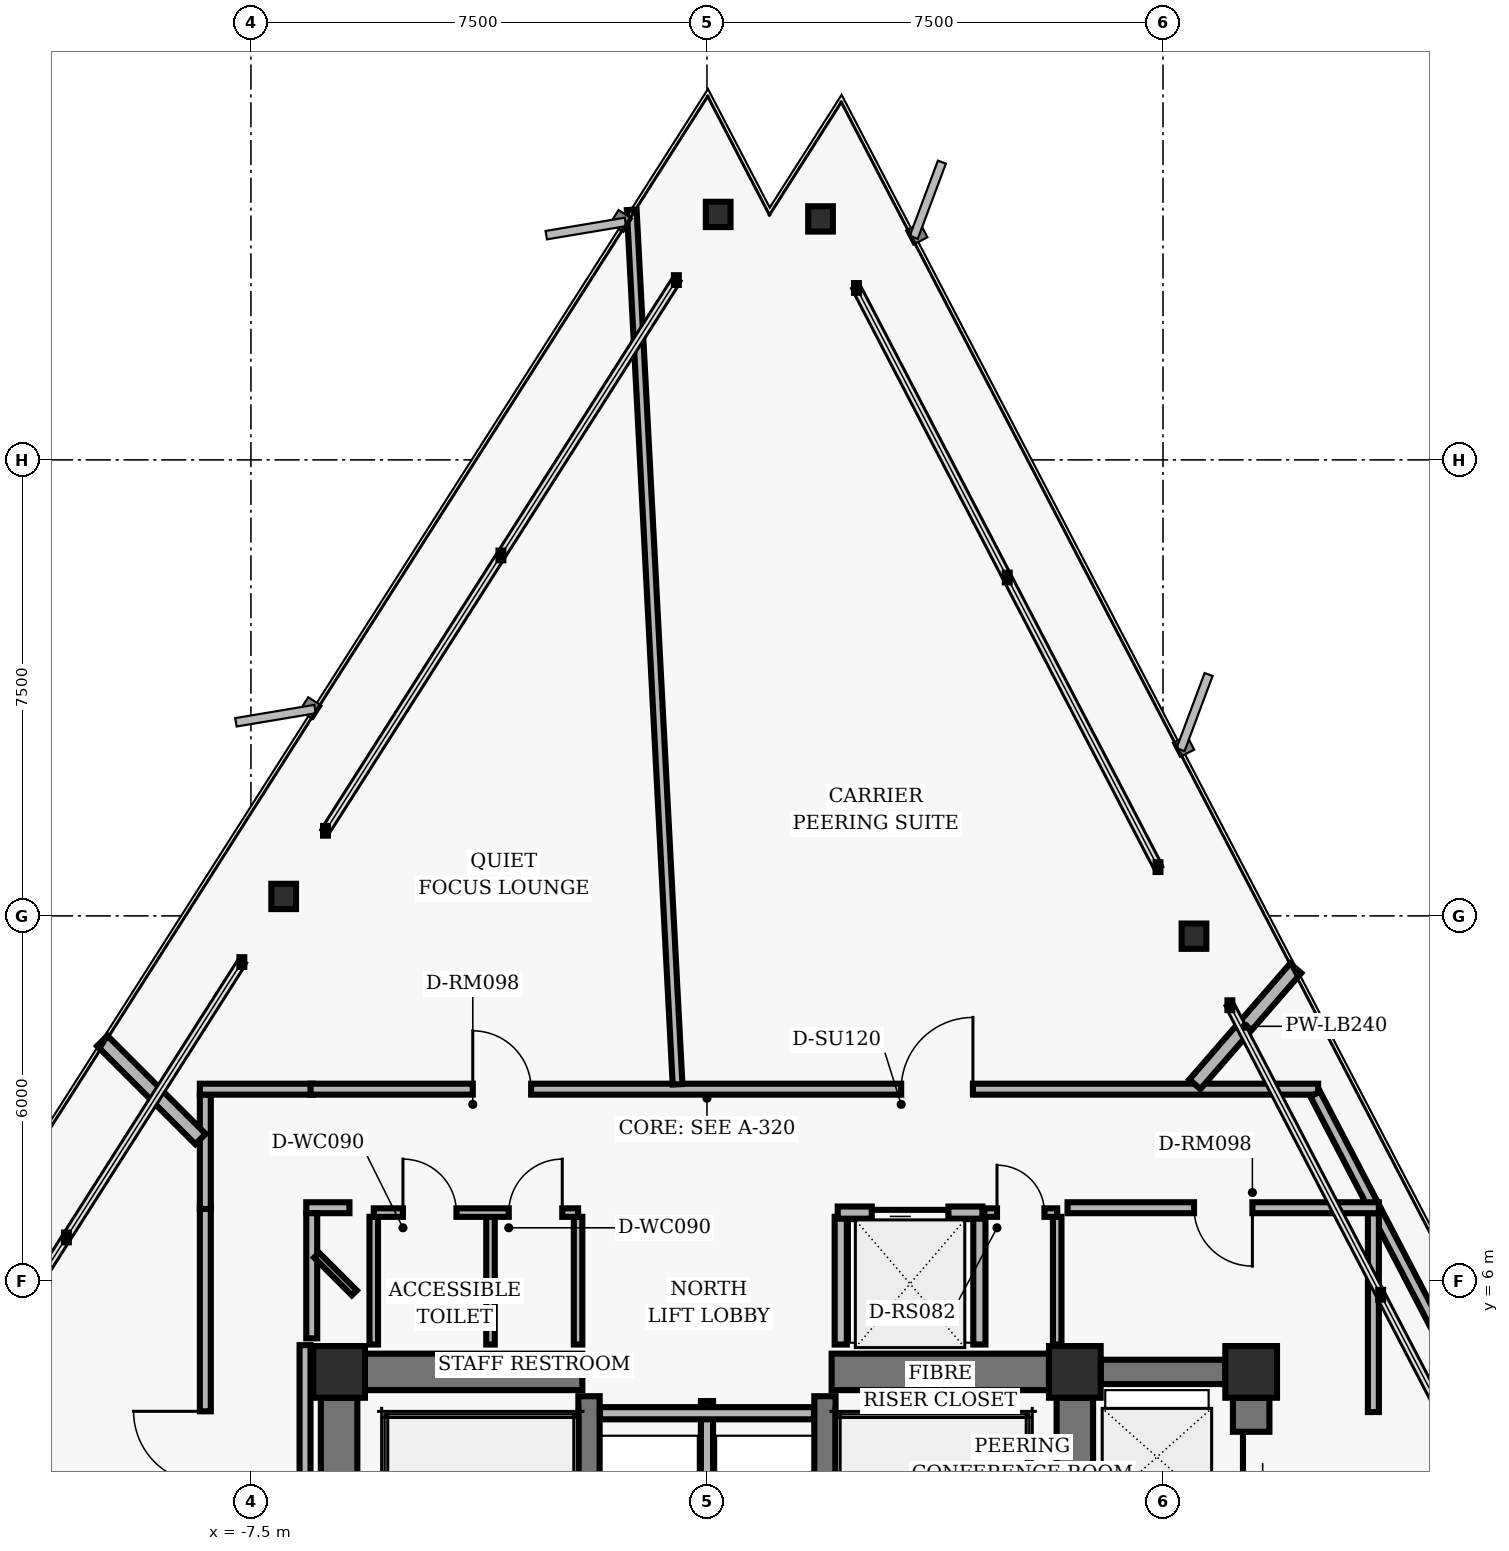
"""IFC4 building model, lengths in metres.
Left out: names, types, materials, properties, quantities, classifications, styles, units other than length and angle.
Written with IfcOpenShell. Run it as: python <this file> out.ifc"""

import sys

from ifc_helpers import new_model, si_unit, direction, frame, frame_2d, origin, origin_2d, place, context, subcontext, project, spatial, rectangle, hollow_rectangle, i_section, extrude, element, fill, save


model = new_model("IFC4")
c1 = context("Model", 3, precision=1e-05, world=origin(), true_north=direction((0.0, 1.0)))
c2 = subcontext(c1, "Body", "Model", "MODEL_VIEW")
j1 = project(units=[si_unit("LENGTHUNIT", "METRE"), si_unit("PLANEANGLEUNIT", "RADIAN")], contexts=[c1])
p1 = place(None, origin())
s1 = spatial("IfcSite", under=j1, at=p1, CompositionType="ELEMENT")
p2 = place(p1, origin())
s2 = spatial("IfcBuilding", under=s1, at=p2, CompositionType="ELEMENT")
p3 = place(p2, frame((0.0, 0.0, 132.0)))
s3 = spatial("IfcBuildingStorey", under=s2, at=p3, CompositionType="ELEMENT", Elevation=132.0)
for number, where, z_axis, x_axis in (
    (1, (-6.05, 4.5, 0.0), (0.0, 0.0, 1.0), (1.0, 0.0, 0.0)),
    (2, (6.05, 4.5, 0.0), (0.0, 0.0, 1.0), (1.0, 0.0, 0.0)),
    (3, (8.95, 4.5, 0.0), (0.0, 0.0, 1.0), (1.0, 0.0, 0.0)),
):
    element("IfcColumn", number, at=place(p3, frame(where, z_axis=z_axis, x_axis=x_axis)), inside=s3, PredefinedType="COLUMN", context=c2, shape_type="SweptSolid", body=[
        extrude(hollow_rectangle(XDim=0.85, YDim=0.85, WallThickness=0.055, InnerFilletRadius=0.02, OuterFilletRadius=0.04, at=origin_2d()), origin(), (0.0, 0.0, 1.0), 3.04),
    ])
for number, where, z_axis, x_axis in (
    (4, (-6.05, 0.425, 0.0), (0.0, 0.0, 1.0), (0.0, 1.0, 0.0)),
    (5, (6.05, 0.425, 0.0), (0.0, 0.0, 1.0), (0.0, 1.0, 0.0)),
):
    element("IfcWall", number, at=place(p3, frame(where, z_axis=z_axis, x_axis=x_axis)), inside=s3, PredefinedType="SHEAR", context=c2, shape_type="SweptSolid", body=[
        extrude(rectangle(XDim=3.65, YDim=0.6, at=frame_2d((1.825, 0.0))), origin(), (0.0, 0.0, 1.0), 2.788),
    ])
for number, where, z_axis, x_axis in (
    (6, (-1.94, -4.1, 0.0), (0.0, 0.0, 1.0), (0.0, 1.0, 0.0)),
    (7, (1.94, -4.1, 0.0), (0.0, 0.0, 1.0), (0.0, 1.0, 0.0)),
):
    element("IfcWall", number, at=place(p3, frame(where, z_axis=z_axis, x_axis=x_axis)), inside=s3, PredefinedType="SHEAR", context=c2, shape_type="SweptSolid", body=[
        extrude(rectangle(XDim=8.2, YDim=0.35, at=frame_2d((4.1, 0.0))), origin(), (0.0, 0.0, 1.0), 2.788),
    ])
for number, where, z_axis, x_axis in (
    (8, (-5.625, 4.5, 0.0), (0.0, 0.0, 1.0), (1.0, 0.0, 0.0)),
    (9, (2.05, 4.5, 0.0), (0.0, 0.0, 1.0), (1.0, 0.0, 0.0)),
):
    element("IfcWall", number, at=place(p3, frame(where, z_axis=z_axis, x_axis=x_axis)), inside=s3, PredefinedType="SHEAR", context=c2, shape_type="SweptSolid", body=[
        extrude(rectangle(XDim=3.575, YDim=0.6, at=frame_2d((1.788, 0.0))), origin(), (0.0, 0.0, 1.0), 2.788),
    ])
p4 = place(p3, frame((8.95, -3.875, 0.0), z_axis=(0.0, 0.0, 1.0), x_axis=(0.0, 1.0, 0.0)))
e10 = element("IfcWall", 10, at=p4, inside=s3, PredefinedType="SHEAR", context=c2, shape_type="SweptSolid", body=[
    extrude(rectangle(XDim=7.95, YDim=0.6, at=frame_2d((3.975, 0.0))), origin(), (0.0, 0.0, 1.0), 2.788),
])
p5 = place(p4, frame((0.55, 0.0, 0.0)))
e11 = element("IfcOpeningElement", 11, at=p5, cuts=e10, PredefinedType="OPENING", context=c2, shape_type="SweptSolid", body=[
    extrude(rectangle(XDim=1.06, YDim=2.04, at=frame_2d((0.53, 1.02))), frame((0.0, 0.31, 0.0), z_axis=(0.0, -1.0, 0.0), x_axis=(1.0, 0.0, 0.0)), (0.0, 0.0, 1.0), 0.62),
])
p6 = place(p4, frame((3.445, 0.0, 0.0)))
e12 = element("IfcOpeningElement", 12, at=p6, cuts=e10, PredefinedType="OPENING", context=c2, shape_type="SweptSolid", body=[
    extrude(rectangle(XDim=1.06, YDim=2.04, at=frame_2d((0.53, 1.02))), frame((0.0, 0.31, 0.0), z_axis=(0.0, -1.0, 0.0), x_axis=(1.0, 0.0, 0.0)), (0.0, 0.0, 1.0), 0.62),
])
p7 = place(p4, frame((6.33, 0.0, 0.0)))
e13 = element("IfcOpeningElement", 13, at=p7, cuts=e10, PredefinedType="OPENING", context=c2, shape_type="SweptSolid", body=[
    extrude(rectangle(XDim=1.06, YDim=2.04, at=frame_2d((0.53, 1.02))), frame((0.0, 0.31, 0.0), z_axis=(0.0, -1.0, 0.0), x_axis=(1.0, 0.0, 0.0)), (0.0, 0.0, 1.0), 0.62),
])
p8 = place(p3, frame((6.475, 4.5, 0.0), z_axis=(0.0, 0.0, 1.0), x_axis=(1.0, 0.0, 0.0)))
e14 = element("IfcWall", 14, at=p8, inside=s3, PredefinedType="SHEAR", context=c2, shape_type="SweptSolid", body=[
    extrude(rectangle(XDim=2.05, YDim=0.4, at=frame_2d((1.025, 0.0))), origin(), (0.0, 0.0, 1.0), 2.788),
])
for number, where, z_axis, x_axis in (
    (15, (8.009, 11.666, 0.0), (0.0, 0.0, 1.0), (1.0, 0.0, 0.0)),
    (16, (1.868, 23.463, 0.0), (0.0, 0.0, 1.0), (1.0, 0.0, 0.0)),
    (17, (0.184, 23.537, 0.0), (0.0, 0.0, 1.0), (1.0, 0.0, 0.0)),
    (18, (-6.962, 12.32, 0.0), (0.0, 0.0, 1.0), (1.0, 0.0, 0.0)),
):
    element("IfcColumn", number, at=place(p3, frame(where, z_axis=z_axis, x_axis=x_axis)), inside=s3, PredefinedType="COLUMN", context=c2, shape_type="SweptSolid", body=[
        extrude(i_section(OverallWidth=0.406, OverallDepth=0.416, WebThickness=0.03, FlangeThickness=0.048, FilletRadius=0.02, at=origin_2d()), origin(), (0.0, 0.0, 1.0), 3.04),
    ])
p9 = place(p3, frame((0.0, 1.25, 0.0), z_axis=(0.0, 0.0, 1.0), x_axis=(0.0, 1.0, 0.0)))
e19 = element("IfcWall", 19, at=p9, inside=s3, PredefinedType="PARTITIONING", context=c2, shape_type="SweptSolid", body=[
    extrude(rectangle(XDim=2.77, YDim=0.2, at=frame_2d((1.385, 0.0))), origin(), (0.0, 0.0, 1.0), 2.763),
])
p10 = place(p3, frame((-1.76, 3.82, 0.0), z_axis=(0.0, 0.0, 1.0), x_axis=(1.0, 0.0, 0.0)))
e20 = element("IfcWall", 20, at=p10, inside=s3, PredefinedType="PARTITIONING", context=c2, shape_type="SweptSolid", body=[
    extrude(rectangle(XDim=3.52, YDim=0.2, at=frame_2d((1.76, 0.0))), origin(), (0.0, 0.0, 1.0), 2.763),
])
for number, where, z_axis, x_axis in (
    (21, (2.2, 4.95, 0.0), (0.0, 0.0, 1.0), (0.0, 1.0, 0.0)),
    (22, (4.48, 4.95, 0.0), (0.0, 0.0, 1.0), (0.0, 1.0, 0.0)),
):
    element("IfcWall", number, at=place(p3, frame(where, z_axis=z_axis, x_axis=x_axis)), inside=s3, PredefinedType="PARTITIONING", context=c2, shape_type="SweptSolid", body=[
        extrude(rectangle(XDim=2.1, YDim=0.2, at=frame_2d((1.05, 0.0))), origin(), (0.0, 0.0, 1.0), 2.763),
    ])
p11 = place(p3, frame((2.15, 7.12, 0.0), z_axis=(0.0, 0.0, 1.0), x_axis=(1.0, 0.0, 0.0)))
e23 = element("IfcWall", 23, at=p11, inside=s3, PredefinedType="PARTITIONING", context=c2, shape_type="SweptSolid", body=[
    extrude(rectangle(XDim=2.38, YDim=0.2, at=frame_2d((1.19, 0.0))), origin(), (0.0, 0.0, 1.0), 2.763),
])
p12 = place(p11, frame((0.56, 0.0, 0.0)))
e24 = element("IfcOpeningElement", 24, at=p12, cuts=e23, PredefinedType="OPENING", context=c2, shape_type="SweptSolid", body=[
    extrude(rectangle(XDim=1.26, YDim=2.06, at=frame_2d((0.63, 1.03))), frame((0.0, 0.11, 0.0), z_axis=(0.0, -1.0, 0.0), x_axis=(1.0, 0.0, 0.0)), (0.0, 0.0, 1.0), 0.22),
])
for number, where, z_axis, x_axis in (
    (25, (-5.48, 4.95, 0.0), (0.0, 0.0, 1.0), (0.0, 1.0, 0.0)),
    (26, (-3.56, 4.95, 0.0), (0.0, 0.0, 1.0), (0.0, 1.0, 0.0)),
    (27, (-2.12, 4.95, 0.0), (0.0, 0.0, 1.0), (0.0, 1.0, 0.0)),
):
    element("IfcWall", number, at=place(p3, frame(where, z_axis=z_axis, x_axis=x_axis)), inside=s3, PredefinedType="PARTITIONING", context=c2, shape_type="SweptSolid", body=[
        extrude(rectangle(XDim=2.1, YDim=0.14, at=frame_2d((1.05, 0.0))), origin(), (0.0, 0.0, 1.0), 2.763),
    ])
p13 = place(p3, frame((-5.48, 7.12, 0.0), z_axis=(0.0, 0.0, 1.0), x_axis=(1.0, 0.0, 0.0)))
e28 = element("IfcWall", 28, at=p13, inside=s3, PredefinedType="PARTITIONING", context=c2, shape_type="SweptSolid", body=[
    extrude(rectangle(XDim=3.36, YDim=0.14, at=frame_2d((1.68, 0.0))), origin(), (0.0, 0.0, 1.0), 2.33),
])
p14 = place(p13, frame((0.48, 0.0, 0.0)))
e29 = element("IfcOpeningElement", 29, at=p14, cuts=e28, PredefinedType="OPENING", context=c2, shape_type="SweptSolid", body=[
    extrude(rectangle(XDim=0.88, YDim=2.02, at=frame_2d((0.44, 1.01))), frame((0.0, 0.08, 0.0), z_axis=(0.0, -1.0, 0.0), x_axis=(1.0, 0.0, 0.0)), (0.0, 0.0, 1.0), 0.16),
])
p15 = place(p13, frame((2.22, 0.0, 0.0)))
e30 = element("IfcOpeningElement", 30, at=p15, cuts=e28, PredefinedType="OPENING", context=c2, shape_type="SweptSolid", body=[
    extrude(rectangle(XDim=0.88, YDim=2.02, at=frame_2d((0.44, 1.01))), frame((0.0, 0.08, 0.0), z_axis=(0.0, -1.0, 0.0), x_axis=(1.0, 0.0, 0.0)), (0.0, 0.0, 1.0), 0.16),
])
p16 = place(p3, frame((5.76, 4.95, 0.0), z_axis=(0.0, 0.0, 1.0), x_axis=(0.0, 1.0, 0.0)))
e31 = element("IfcWall", 31, at=p16, inside=s3, PredefinedType="PARTITIONING", context=c2, shape_type="SweptSolid", body=[
    extrude(rectangle(XDim=2.1, YDim=0.14, at=frame_2d((1.05, 0.0))), origin(), (0.0, 0.0, 1.0), 2.763),
])
p17 = place(p3, frame((4.56, 7.12, 0.0), z_axis=(0.0, 0.0, 1.0), x_axis=(1.0, 0.0, 0.0)))
e32 = element("IfcWall", 32, at=p17, inside=s3, PredefinedType="PARTITIONING", context=c2, shape_type="SweptSolid", body=[
    extrude(rectangle(XDim=1.2, YDim=0.14, at=frame_2d((0.6, 0.0))), origin(), (0.0, 0.0, 1.0), 2.763),
])
p18 = place(p17, frame((0.21, 0.0, 0.0)))
e33 = element("IfcOpeningElement", 33, at=p18, cuts=e32, PredefinedType="OPENING", context=c2, shape_type="SweptSolid", body=[
    extrude(rectangle(XDim=0.78, YDim=2.01, at=frame_2d((0.39, 1.005))), frame((0.0, 0.08, 0.0), z_axis=(0.0, -1.0, 0.0), x_axis=(1.0, 0.0, 0.0)), (0.0, 0.0, 1.0), 0.16),
])
p19 = place(p3, frame((-8.25, -7.22, 0.0), z_axis=(0.0, 0.0, 1.0), x_axis=(0.0, 1.0, 0.0)))
e34 = element("IfcWall", 34, at=p19, inside=s3, PredefinedType="PARTITIONING", context=c2, shape_type="SweptSolid", body=[
    extrude(rectangle(XDim=14.44, YDim=0.18, at=frame_2d((7.22, 0.0))), origin(), (0.0, 0.0, 1.0), 2.763),
])
p20 = place(p19, frame((2.932, 0.0, 0.0)))
e35 = element("IfcOpeningElement", 35, at=p20, cuts=e34, PredefinedType="OPENING", context=c2, shape_type="SweptSolid", body=[
    extrude(rectangle(XDim=1.18, YDim=2.02, at=frame_2d((0.59, 1.01))), frame((0.0, 0.1, 0.0), z_axis=(0.0, -1.0, 0.0), x_axis=(1.0, 0.0, 0.0)), (0.0, 0.0, 1.0), 0.2),
])
p21 = place(p19, frame((9.892, 0.0, 0.0)))
e36 = element("IfcOpeningElement", 36, at=p21, cuts=e34, PredefinedType="OPENING", context=c2, shape_type="SweptSolid", body=[
    extrude(rectangle(XDim=1.18, YDim=2.02, at=frame_2d((0.59, 1.01))), frame((0.0, 0.1, 0.0), z_axis=(0.0, -1.0, 0.0), x_axis=(1.0, 0.0, 0.0)), (0.0, 0.0, 1.0), 0.2),
])
p22 = place(p3, frame((-8.25, 7.18, 0.0), z_axis=(0.0, 0.0, 1.0), x_axis=(0.0, 1.0, 0.0)))
e37 = element("IfcWall", 37, at=p22, inside=s3, PredefinedType="PARTITIONING", context=c2, shape_type="SweptSolid", body=[
    extrude(rectangle(XDim=1.88, YDim=0.18, at=frame_2d((0.94, 0.0))), origin(), (0.0, 0.0, 1.0), 2.763),
])
p23 = place(p3, frame((-8.34, 9.15, 0.0), z_axis=(0.0, 0.0, 1.0), x_axis=(1.0, 0.0, 0.0)))
e38 = element("IfcWall", 38, at=p23, inside=s3, PredefinedType="PARTITIONING", context=c2, shape_type="SweptSolid", body=[
    extrude(rectangle(XDim=1.86, YDim=0.18, at=frame_2d((0.93, 0.0))), origin(), (0.0, 0.0, 1.0), 2.763),
])
p24 = place(p3, frame((-6.52, 9.15, 0.0), z_axis=(0.0, 0.0, 1.0), x_axis=(1.0, 0.0, 0.0)))
e39 = element("IfcWall", 39, at=p24, inside=s3, PredefinedType="PARTITIONING", context=c2, shape_type="SweptSolid", body=[
    extrude(rectangle(XDim=16.572, YDim=0.18, at=frame_2d((8.286, 0.0))), origin(), (0.0, 0.0, 1.0), 2.33),
])
p25 = place(p24, frame((9.714, 0.0, 0.0)))
e40 = element("IfcOpeningElement", 40, at=p25, cuts=e39, PredefinedType="OPENING", context=c2, shape_type="SweptSolid", body=[
    extrude(rectangle(XDim=1.18, YDim=2.02, at=frame_2d((0.59, 1.01))), frame((0.0, 0.1, 0.0), z_axis=(0.0, -1.0, 0.0), x_axis=(1.0, 0.0, 0.0)), (0.0, 0.0, 1.0), 0.2),
])
p26 = place(p24, frame((2.668, 0.0, 0.0)))
e41 = element("IfcOpeningElement", 41, at=p26, cuts=e39, PredefinedType="OPENING", context=c2, shape_type="SweptSolid", body=[
    extrude(rectangle(XDim=0.96, YDim=2.02, at=frame_2d((0.48, 1.01))), frame((0.0, 0.1, 0.0), z_axis=(0.0, -1.0, 0.0), x_axis=(1.0, 0.0, 0.0)), (0.0, 0.0, 1.0), 0.2),
])
p27 = place(p3, frame((10.003, 9.07, 0.0), z_axis=(0.0, 0.0, 1.0), x_axis=(0.461740291408, -0.887015165198, 0.0)))
e42 = element("IfcWall", 42, at=p27, inside=s3, PredefinedType="PARTITIONING", context=c2, shape_type="SweptSolid", body=[
    extrude(rectangle(XDim=9.976, YDim=0.18, at=frame_2d((4.988, 0.0))), origin(), (0.0, 0.0, 1.0), 2.763),
])
p28 = place(p3, frame((10.96, 3.84, 0.0), z_axis=(0.0, 0.0, 1.0), x_axis=(0.0, 1.0, 0.0)))
e43 = element("IfcWall", 43, at=p28, inside=s3, PredefinedType="PARTITIONING", context=c2, shape_type="SweptSolid", body=[
    extrude(rectangle(XDim=3.271, YDim=0.18, at=frame_2d((1.635, 0.0))), origin(), (0.0, 0.0, 1.0), 2.763),
])
p29 = place(p3, frame((11.05, 7.2, 0.0), z_axis=(0.0, 0.0, 1.0), x_axis=(-1.0, 0.0, 0.0)))
e44 = element("IfcWall", 44, at=p29, inside=s3, PredefinedType="PARTITIONING", context=c2, shape_type="SweptSolid", body=[
    extrude(rectangle(XDim=5.12, YDim=0.18, at=frame_2d((2.56, 0.0))), origin(), (0.0, 0.0, 1.0), 2.763),
])
p30 = place(p29, frame((2.08, 0.0, 0.0)))
e45 = element("IfcOpeningElement", 45, at=p30, cuts=e44, PredefinedType="OPENING", context=c2, shape_type="SweptSolid", body=[
    extrude(rectangle(XDim=0.96, YDim=2.02, at=frame_2d((0.48, 1.01))), frame((0.0, 0.1, 0.0), z_axis=(0.0, -1.0, 0.0), x_axis=(1.0, 0.0, 0.0)), (0.0, 0.0, 1.0), 0.2),
])
p31 = place(p3, frame((-5.88, 7.2, 0.0), z_axis=(0.0, 0.0, 1.0), x_axis=(-1.0, 0.0, 0.0)))
e46 = element("IfcWall", 46, at=p31, inside=s3, PredefinedType="PARTITIONING", context=c2, shape_type="SweptSolid", body=[
    extrude(rectangle(XDim=0.71, YDim=0.18, at=frame_2d((0.355, 0.0))), origin(), (0.0, 0.0, 1.0), 2.33),
])
p32 = place(p3, frame((-6.5, 7.11, 0.0), z_axis=(0.0, 0.0, 1.0), x_axis=(0.0, -1.0, 0.0)))
e47 = element("IfcWall", 47, at=p32, inside=s3, PredefinedType="PARTITIONING", context=c2, shape_type="SweptSolid", body=[
    extrude(rectangle(XDim=2.058, YDim=0.18, at=frame_2d((1.029, 0.0))), origin(), (0.0, 0.0, 1.0), 2.132),
])
p33 = place(p3, frame((-6.61, 4.94, 0.0), z_axis=(0.0, 0.0, 1.0), x_axis=(0.0, -1.0, 0.0)))
e48 = element("IfcWall", 48, at=p33, inside=s3, PredefinedType="PARTITIONING", context=c2, shape_type="SweptSolid", body=[
    extrude(rectangle(XDim=9.46, YDim=0.18, at=frame_2d((4.73, 0.0))), origin(), (0.0, 0.0, 1.0), 2.763),
])
p34 = place(p3, frame((8.023, 9.23, 0.0), z_axis=(0.0, 0.0, 1.0), x_axis=(0.656032852837, 0.754732334009, 0.0)))
e49 = element("IfcWall", 49, at=p34, inside=s3, PredefinedType="PARTITIONING", context=c2, shape_type="SweptSolid", body=[
    extrude(rectangle(XDim=2.528, YDim=0.24, at=frame_2d((1.264, 0.0))), origin(), (0.0, 0.0, 1.0), 2.763),
])
p35 = place(p3, frame((-0.484, 9.23, 0.0), z_axis=(0.0, 0.0, 1.0), x_axis=(-0.052344416919, 0.998629091313, 0.0)))
e50 = element("IfcWall", 50, at=p35, inside=s3, PredefinedType="PARTITIONING", context=c2, shape_type="SweptSolid", body=[
    extrude(rectangle(XDim=14.403, YDim=0.16, at=frame_2d((7.201, 0.0))), origin(), (0.0, 0.0, 1.0), 2.763),
])
p36 = place(p3, frame((-5.8, 5.8, 0.0), z_axis=(0.0, 0.0, 1.0), x_axis=(-0.707106781187, 0.707106781187, 0.0)))
e51 = element("IfcWall", 51, at=p36, inside=s3, PredefinedType="MOVABLE", context=c2, shape_type="SweptSolid", body=[
    extrude(rectangle(XDim=0.877, YDim=0.115, at=frame_2d((0.438, 0.0))), origin(), (0.0, 0.0, 1.0), 2.763),
])
p37 = place(p3, frame((-8.33, 8.33, 0.0), z_axis=(0.0, 0.0, 1.0), x_axis=(-0.707106781187, 0.707106781187, 0.0)))
e52 = element("IfcWall", 52, at=p37, inside=s3, PredefinedType="PARTITIONING", context=c2, shape_type="SweptSolid", body=[
    extrude(rectangle(XDim=2.284, YDim=0.24, at=frame_2d((1.142, 0.0))), origin(), (0.0, 0.0, 1.0), 2.763),
])
p38 = place(p12, origin())
e53 = element("IfcDoor", 53, at=p38, inside=s3, OperationType="SLIDING_TO_LEFT", PredefinedType="DOOR", context=c2, shape_type="SweptSolid", body=[
    extrude(rectangle(XDim=1.26, YDim=2.06, at=frame_2d((0.63, 1.03))), frame((0.0, 0.025, 0.0), z_axis=(0.0, -1.0, 0.0), x_axis=(1.0, 0.0, 0.0)), (0.0, 0.0, 1.0), 0.05),
])
fill(e24, e53)
p39 = place(p14, origin())
e54 = element("IfcDoor", 54, at=p39, inside=s3, OperationType="SINGLE_SWING_LEFT", PredefinedType="DOOR", context=c2, shape_type="SweptSolid", body=[
    extrude(rectangle(XDim=0.88, YDim=2.02, at=frame_2d((0.44, 1.01))), frame((0.0, 0.025, 0.0), z_axis=(0.0, -1.0, 0.0), x_axis=(1.0, 0.0, 0.0)), (0.0, 0.0, 1.0), 0.05),
])
fill(e29, e54)
p40 = place(p15, origin())
e55 = element("IfcDoor", 55, at=p40, inside=s3, OperationType="SINGLE_SWING_RIGHT", PredefinedType="DOOR", context=c2, shape_type="SweptSolid", body=[
    extrude(rectangle(XDim=0.88, YDim=2.02, at=frame_2d((0.44, 1.01))), frame((0.0, 0.025, 0.0), z_axis=(0.0, -1.0, 0.0), x_axis=(1.0, 0.0, 0.0)), (0.0, 0.0, 1.0), 0.05),
])
fill(e30, e55)
p41 = place(p18, origin())
e56 = element("IfcDoor", 56, at=p41, inside=s3, OperationType="SINGLE_SWING_LEFT", PredefinedType="DOOR", context=c2, shape_type="SweptSolid", body=[
    extrude(rectangle(XDim=0.78, YDim=2.01, at=frame_2d((0.39, 1.005))), frame((0.0, 0.025, 0.0), z_axis=(0.0, -1.0, 0.0), x_axis=(1.0, 0.0, 0.0)), (0.0, 0.0, 1.0), 0.05),
])
fill(e33, e56)
p42 = place(p7, origin())
e57 = element("IfcDoor", 57, at=p42, inside=s3, OperationType="SLIDING_TO_LEFT", PredefinedType="DOOR", context=c2, shape_type="SweptSolid", body=[
    extrude(rectangle(XDim=1.06, YDim=2.04, at=frame_2d((0.53, 1.02))), frame((0.0, 0.025, 0.0), z_axis=(0.0, -1.0, 0.0), x_axis=(1.0, 0.0, 0.0)), (0.0, 0.0, 1.0), 0.05),
])
fill(e13, e57)
p43 = place(p30, origin())
e58 = element("IfcDoor", 58, at=p43, inside=s3, OperationType="SINGLE_SWING_LEFT", PredefinedType="DOOR", context=c2, shape_type="SweptSolid", body=[
    extrude(rectangle(XDim=0.96, YDim=2.02, at=frame_2d((0.48, 1.01))), frame((0.0, 0.025, 0.0), z_axis=(0.0, -1.0, 0.0), x_axis=(1.0, 0.0, 0.0)), (0.0, 0.0, 1.0), 0.05),
])
fill(e45, e58)
p44 = place(p25, origin())
e59 = element("IfcDoor", 59, at=p44, inside=s3, OperationType="SINGLE_SWING_RIGHT", PredefinedType="DOOR", context=c2, shape_type="SweptSolid", body=[
    extrude(rectangle(XDim=1.18, YDim=2.02, at=frame_2d((0.59, 1.01))), frame((0.0, 0.025, 0.0), z_axis=(0.0, -1.0, 0.0), x_axis=(1.0, 0.0, 0.0)), (0.0, 0.0, 1.0), 0.05),
])
fill(e40, e59)
p45 = place(p26, origin())
e60 = element("IfcDoor", 60, at=p45, inside=s3, OperationType="SINGLE_SWING_LEFT", PredefinedType="DOOR", context=c2, shape_type="SweptSolid", body=[
    extrude(rectangle(XDim=0.96, YDim=2.02, at=frame_2d((0.48, 1.01))), frame((0.0, 0.025, 0.0), z_axis=(0.0, -1.0, 0.0), x_axis=(1.0, 0.0, 0.0)), (0.0, 0.0, 1.0), 0.05),
])
fill(e41, e60)
p46 = place(p21, origin())
e61 = element("IfcDoor", 61, at=p46, inside=s3, OperationType="SINGLE_SWING_RIGHT", PredefinedType="DOOR", context=c2, shape_type="SweptSolid", body=[
    extrude(rectangle(XDim=1.18, YDim=2.02, at=frame_2d((0.59, 1.01))), frame((0.0, 0.025, 0.0), z_axis=(0.0, -1.0, 0.0), x_axis=(1.0, 0.0, 0.0)), (0.0, 0.0, 1.0), 0.05),
])
fill(e36, e61)
save(model, sys.argv[1])
